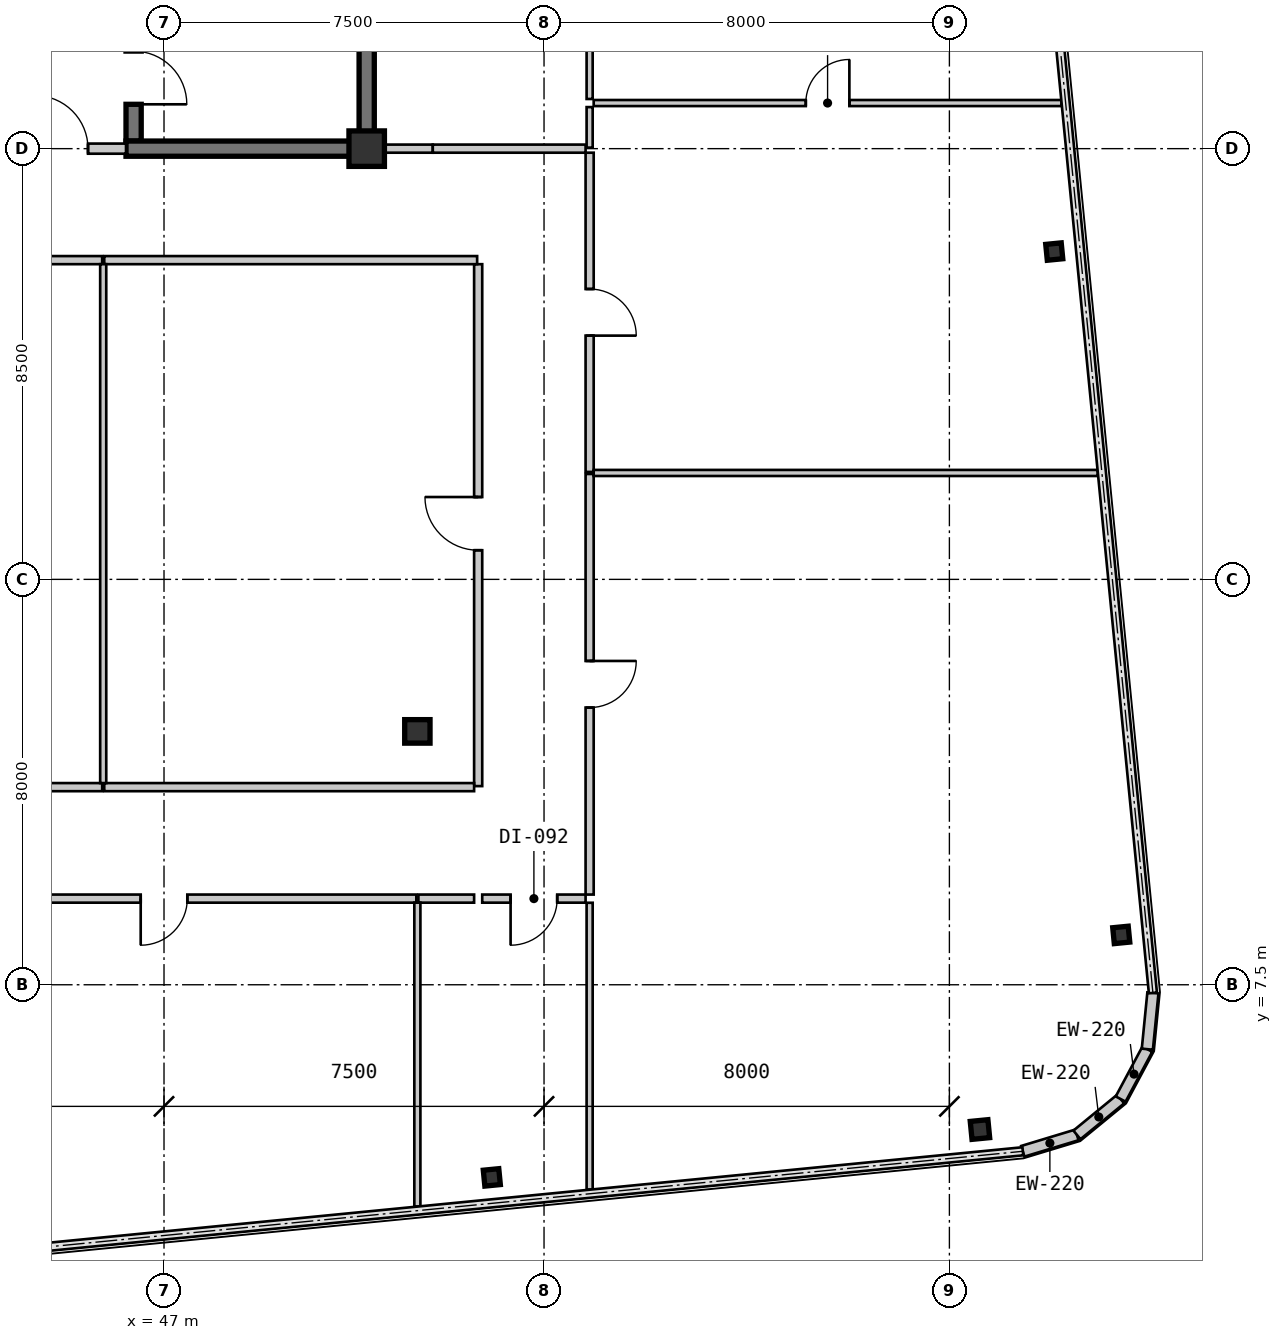
"""IFC4 building model, lengths in metres.
Left out: names, types, materials, properties, quantities, classifications, styles, units other than length and angle.
Written with IfcOpenShell. Run it as: python <this file> out.ifc"""

import sys

from ifc_helpers import new_model, si_unit, direction, frame, frame_2d, origin, origin_2d, place, context, subcontext, project, spatial, rectangle, i_section, extrude, source, transform, mapped, element, fill, save


model = new_model("IFC4")
c1 = context("Model", 3, precision=1e-05, world=origin(), true_north=direction((0.0, 1.0)))
c2 = subcontext(c1, "Body", "Model", "MODEL_VIEW")
j1 = project(units=[si_unit("LENGTHUNIT", "METRE"), si_unit("PLANEANGLEUNIT", "RADIAN")], contexts=[c1])
p1 = place(None, origin())
s1 = spatial("IfcSite", under=j1, at=p1, CompositionType="ELEMENT")
p2 = place(p1, origin())
s2 = spatial("IfcBuilding", under=s1, at=p2, CompositionType="ELEMENT")
p3 = place(p2, frame((0.0, 0.0, 93.45)))
s3 = spatial("IfcBuildingStorey", under=s2, at=p3, CompositionType="ELEMENT", Elevation=93.45)
m1 = source(origin(), c2, "Body", "SweptSolid", [
    extrude(rectangle(XDim=0.7, YDim=0.7, at=origin_2d()), origin(), (0.0, 0.0, 1.0), 3.15),
])
p4 = place(p3, frame((51.0, 24.0, 0.0), z_axis=(0.0, 0.0, 1.0), x_axis=(1.0, 0.0, 0.0)))
e1 = element("IfcColumn", 1, at=p4, inside=s3, PredefinedType="COLUMN", context=c2, shape_type="MappedRepresentation", body=[
    mapped(m1, transform((0.0, 0.0, 0.0), scale=1.0)),
])
m2 = source(origin(), c2, "Body", "SweptSolid", [
    extrude(i_section(OverallWidth=0.5, OverallDepth=0.464, WebThickness=0.022, FlangeThickness=0.034, at=origin_2d()), origin(), (0.0, 0.0, 1.0), 3.15),
])
p5 = place(p3, frame((52.0, 12.5, 0.0), z_axis=(0.0, 0.0, 1.0), x_axis=(1.0, 0.0, 0.0)))
e2 = element("IfcColumn", 2, at=p5, inside=s3, PredefinedType="COLUMN", context=c2, shape_type="MappedRepresentation", body=[
    mapped(m2, transform((0.0, 0.0, 0.0), scale=1.0)),
])
m3 = source(origin(), c2, "Body", "SweptSolid", [
    extrude(i_section(OverallWidth=0.307, OverallDepth=0.315, WebThickness=0.012, FlangeThickness=0.019, at=origin_2d()), origin(), (0.0, 0.0, 1.0), 3.15),
])
p6 = place(p3, frame((53.469, 3.698, 0.0), z_axis=(0.0, 0.0, 1.0), x_axis=(0.995227399982, 0.097582899759, 0.0)))
e3 = element("IfcColumn", 3, at=p6, inside=s3, PredefinedType="COLUMN", context=c2, shape_type="MappedRepresentation", body=[
    mapped(m3, transform((0.0, 0.0, 0.0), scale=1.0)),
])
m4 = source(origin(), c2, "Body", "SweptSolid", [
    extrude(i_section(OverallWidth=0.35, OverallDepth=0.356, WebThickness=0.018, FlangeThickness=0.028, at=origin_2d()), origin(), (0.0, 0.0, 1.0), 3.15),
])
p7 = place(p3, frame((63.103, 4.643, 0.0), z_axis=(0.0, 0.0, 1.0), x_axis=(0.995227399982, 0.097582899759, 0.0)))
e4 = element("IfcColumn", 4, at=p7, inside=s3, PredefinedType="COLUMN", context=c2, shape_type="MappedRepresentation", body=[
    mapped(m4, transform((0.0, 0.0, 0.0), scale=1.0)),
])
for number, where, z_axis, x_axis in (
    (5, (65.892, 8.484, 0.0), (0.0, 0.0, 1.0), (0.995, 0.098, 0.0)),
    (6, (64.57, 21.969, 0.0), (0.0, 0.0, 1.0), (0.995, 0.098, 0.0)),
):
    element("IfcColumn", number, at=place(p3, frame(where, z_axis=z_axis, x_axis=x_axis)), inside=s3, PredefinedType="COLUMN", context=c2, shape_type="MappedRepresentation", body=[
        mapped(m3, transform((0.0, 0.0, 0.0), scale=1.0)),
    ])
m5 = source(origin(), c2, "Body", "SweptSolid", [
    extrude(rectangle(XDim=1.116, YDim=0.22, at=frame_2d((0.558, 0.0))), origin(), (0.0, 0.0, 1.0), 2.93),
])
p8 = place(p3, frame((63.949, 4.214, 0.0), z_axis=(0.0, 0.0, 1.0), x_axis=(0.957052003726, 0.289916301997, 0.0)))
e7 = element("IfcWall", 7, at=p8, inside=s3, PredefinedType="SOLIDWALL", context=c2, shape_type="MappedRepresentation", body=[
    mapped(m5, transform((0.0, 0.0, 0.0), scale=1.0)),
])
m6 = source(origin(), c2, "Body", "SweptSolid", [
    extrude(rectangle(XDim=1.116, YDim=0.22, at=frame_2d((0.558, 0.0))), origin(), (0.0, 0.0, 1.0), 2.93),
])
p9 = place(p3, frame((65.017, 4.537, 0.0), z_axis=(0.0, 0.0, 1.0), x_axis=(0.773342870285, 0.633988016432, 0.0)))
e8 = element("IfcWall", 8, at=p9, inside=s3, PredefinedType="SOLIDWALL", context=c2, shape_type="MappedRepresentation", body=[
    mapped(m6, transform((0.0, 0.0, 0.0), scale=1.0)),
])
p10 = place(p3, frame((65.88, 5.245, 0.0), z_axis=(0.0, 0.0, 1.0), x_axis=(0.471723463201, 0.881746547635, 0.0)))
e9 = element("IfcWall", 9, at=p10, inside=s3, PredefinedType="SOLIDWALL", context=c2, shape_type="MappedRepresentation", body=[
    mapped(m5, transform((0.0, 0.0, 0.0), scale=1.0)),
])
p11 = place(p3, frame((66.406, 6.229, 0.0), z_axis=(0.0, 0.0, 1.0), x_axis=(0.09844234778, 0.995142755671, 0.0)))
e10 = element("IfcWall", 10, at=p11, inside=s3, PredefinedType="SOLIDWALL", context=c2, shape_type="MappedRepresentation", body=[
    mapped(m6, transform((0.0, 0.0, 0.0), scale=1.0)),
])
m7 = source(origin(), c2, "Body", "SweptSolid", [
    extrude(rectangle(XDim=4.05, YDim=0.3, at=frame_2d((2.025, 0.0))), origin(), (0.0, 0.0, 1.0), 2.93),
])
p12 = place(p3, frame((51.0, 24.15, 0.0), z_axis=(0.0, 0.0, 1.0), x_axis=(0.0, 1.0, 0.0)))
e11 = element("IfcWall", 11, at=p12, inside=s3, PredefinedType="SHEAR", context=c2, shape_type="MappedRepresentation", body=[
    mapped(m7, transform((0.0, 0.0, 0.0), scale=1.0)),
])
m8 = source(origin(), c2, "Body", "SweptSolid", [
    extrude(rectangle(XDim=3.9, YDim=0.3, at=frame_2d((1.95, 0.0))), origin(), (0.0, 0.0, 1.0), 2.93),
])
p13 = place(p3, frame((46.4, 28.05, 0.0), z_axis=(0.0, 0.0, 1.0), x_axis=(0.0, -1.0, 0.0)))
e12 = element("IfcWall", 12, at=p13, inside=s3, PredefinedType="SHEAR", context=c2, shape_type="MappedRepresentation", body=[
    mapped(m8, transform((0.0, 0.0, 0.0), scale=1.0)),
])
m9 = source(origin(), c2, "Body", "SweptSolid", [
    extrude(rectangle(XDim=1.05, YDim=2.1, at=frame_2d((0.525, 1.05))), frame((0.0, 0.16, 0.0), z_axis=(0.0, -1.0, 0.0), x_axis=(1.0, 0.0, 0.0)), (0.0, 0.0, 1.0), 0.32),
])
p14 = place(p13, frame((2.125, 0.0, 0.0)))
e13 = element("IfcOpeningElement", 13, at=p14, cuts=e12, PredefinedType="OPENING", context=c2, shape_type="MappedRepresentation", body=[
    mapped(m9, transform((0.0, 0.0, 0.0), scale=1.0)),
])
m10 = source(origin(), c2, "Body", "SweptSolid", [
    extrude(rectangle(XDim=4.9, YDim=0.3, at=frame_2d((2.45, 0.0))), origin(), (0.0, 0.0, 1.0), 2.93),
])
p15 = place(p3, frame((46.25, 24.0, 0.0), z_axis=(0.0, 0.0, 1.0), x_axis=(1.0, 0.0, 0.0)))
e14 = element("IfcWall", 14, at=p15, inside=s3, PredefinedType="SHEAR", context=c2, shape_type="MappedRepresentation", body=[
    mapped(m10, transform((0.0, 0.0, 0.0), scale=1.0)),
])
m11 = source(origin(), c2, "Body", "SweptSolid", [
    extrude(rectangle(XDim=2.7, YDim=0.2, at=frame_2d((1.35, 0.0))), origin(), (0.0, 0.0, 1.0), 2.397),
])
p16 = place(p3, frame((43.55, 24.0, 0.0), z_axis=(0.0, 0.0, 1.0), x_axis=(1.0, 0.0, 0.0)))
e15 = element("IfcWall", 15, at=p16, inside=s3, PredefinedType="SOLIDWALL", context=c2, shape_type="MappedRepresentation", body=[
    mapped(m11, transform((0.0, 0.0, 0.0), scale=1.0)),
])
m12 = source(origin(), c2, "Body", "SweptSolid", [
    extrude(rectangle(XDim=1.05, YDim=2.1, at=frame_2d((0.525, 1.05))), frame((0.0, 0.11, 0.0), z_axis=(0.0, -1.0, 0.0), x_axis=(1.0, 0.0, 0.0)), (0.0, 0.0, 1.0), 0.22),
])
p17 = place(p16, frame((0.9, 0.0, 0.0)))
e16 = element("IfcOpeningElement", 16, at=p17, cuts=e15, PredefinedType="OPENING", context=c2, shape_type="MappedRepresentation", body=[
    mapped(m12, transform((0.0, 0.0, 0.0), scale=1.0)),
])
m13 = source(origin(), c2, "Body", "SweptSolid", [
    extrude(rectangle(XDim=7.26, YDim=0.16, at=frame_2d((3.63, 0.0))), origin(), (0.0, 0.0, 1.0), 2.93),
])
p18 = place(p3, frame((45.78, 21.8, 0.0), z_axis=(0.0, 0.0, 1.0), x_axis=(-1.0, 0.0, 0.0)))
e17 = element("IfcWall", 17, at=p18, inside=s3, PredefinedType="PARTITIONING", context=c2, shape_type="MappedRepresentation", body=[
    mapped(m13, transform((0.0, 0.0, 0.0), scale=1.0)),
])
m14 = source(origin(), c2, "Body", "SweptSolid", [
    extrude(rectangle(XDim=1.05, YDim=2.1, at=frame_2d((0.525, 1.05))), frame((0.0, 0.09, 0.0), z_axis=(0.0, -1.0, 0.0), x_axis=(1.0, 0.0, 0.0)), (0.0, 0.0, 1.0), 0.18),
])
p19 = place(p18, frame((3.105, 0.0, 0.0)))
e18 = element("IfcOpeningElement", 18, at=p19, cuts=e17, PredefinedType="OPENING", context=c2, shape_type="MappedRepresentation", body=[
    mapped(m14, transform((0.0, 0.0, 0.0), scale=1.0)),
])
m15 = source(origin(), c2, "Body", "SweptSolid", [
    extrude(rectangle(XDim=10.3, YDim=0.16, at=frame_2d((5.15, 0.0))), origin(), (0.0, 0.0, 1.0), 2.93),
])
p20 = place(p3, frame((53.2, 11.42, 0.0), z_axis=(0.0, 0.0, 1.0), x_axis=(0.0, 1.0, 0.0)))
e19 = element("IfcWall", 19, at=p20, inside=s3, PredefinedType="PARTITIONING", context=c2, shape_type="MappedRepresentation", body=[
    mapped(m15, transform((0.0, 0.0, 0.0), scale=1.0)),
])
p21 = place(p20, frame((4.655, 0.0, 0.0)))
e20 = element("IfcOpeningElement", 20, at=p21, cuts=e19, PredefinedType="OPENING", context=c2, shape_type="MappedRepresentation", body=[
    mapped(m14, transform((0.0, 0.0, 0.0), scale=1.0)),
])
m16 = source(origin(), c2, "Body", "SweptSolid", [
    extrude(rectangle(XDim=7.359, YDim=0.16, at=frame_2d((3.68, 0.0))), origin(), (0.0, 0.0, 1.0), 2.93),
])
p22 = place(p3, frame((53.18, 21.8, 0.0), z_axis=(0.0, 0.0, 1.0), x_axis=(-1.0, 0.0, 0.0)))
e21 = element("IfcWall", 21, at=p22, inside=s3, PredefinedType="PARTITIONING", context=c2, shape_type="MappedRepresentation", body=[
    mapped(m16, transform((0.0, 0.0, 0.0), scale=1.0)),
])
m17 = source(origin(), c2, "Body", "SweptSolid", [
    extrude(rectangle(XDim=2.04, YDim=0.16, at=frame_2d((1.02, 0.0))), origin(), (0.0, 0.0, 1.0), 2.93),
])
p23 = place(p3, frame((55.32, 9.2, 0.0), z_axis=(0.0, 0.0, 1.0), x_axis=(-1.0, 0.0, 0.0)))
e22 = element("IfcWall", 22, at=p23, inside=s3, PredefinedType="PARTITIONING", context=c2, shape_type="MappedRepresentation", body=[
    mapped(m17, transform((0.0, 0.0, 0.0), scale=1.0)),
])
m18 = source(origin(), c2, "Body", "SweptSolid", [
    extrude(rectangle(XDim=0.92, YDim=2.1, at=frame_2d((0.46, 1.05))), frame((0.0, 0.09, 0.0), z_axis=(0.0, -1.0, 0.0), x_axis=(1.0, 0.0, 0.0)), (0.0, 0.0, 1.0), 0.18),
])
p24 = place(p23, frame((0.56, 0.0, 0.0)))
e23 = element("IfcOpeningElement", 23, at=p24, cuts=e22, PredefinedType="OPENING", context=c2, shape_type="MappedRepresentation", body=[
    mapped(m18, transform((0.0, 0.0, 0.0), scale=1.0)),
])
m19 = source(origin(), c2, "Body", "SweptSolid", [
    extrude(rectangle(XDim=8.3, YDim=0.16, at=frame_2d((4.15, 0.0))), origin(), (0.0, 0.0, 1.0), 2.93),
])
p25 = place(p3, frame((55.4, 17.58, 0.0), z_axis=(0.0, 0.0, 1.0), x_axis=(0.0, -1.0, 0.0)))
e24 = element("IfcWall", 24, at=p25, inside=s3, PredefinedType="PARTITIONING", context=c2, shape_type="MappedRepresentation", body=[
    mapped(m19, transform((0.0, 0.0, 0.0), scale=1.0)),
])
p26 = place(p25, frame((3.69, 0.0, 0.0)))
e25 = element("IfcOpeningElement", 25, at=p26, cuts=e24, PredefinedType="OPENING", context=c2, shape_type="MappedRepresentation", body=[
    mapped(m18, transform((0.0, 0.0, 0.0), scale=1.0)),
])
m20 = source(origin(), c2, "Body", "SweptSolid", [
    extrude(rectangle(XDim=6.3, YDim=0.16, at=frame_2d((3.15, 0.0))), origin(), (0.0, 0.0, 1.0), 2.93),
])
p27 = place(p3, frame((55.4, 23.92, 0.0), z_axis=(0.0, 0.0, 1.0), x_axis=(0.0, -1.0, 0.0)))
e26 = element("IfcWall", 26, at=p27, inside=s3, PredefinedType="PARTITIONING", context=c2, shape_type="MappedRepresentation", body=[
    mapped(m20, transform((0.0, 0.0, 0.0), scale=1.0)),
])
p28 = place(p27, frame((2.69, 0.0, 0.0)))
e27 = element("IfcOpeningElement", 27, at=p28, cuts=e26, PredefinedType="OPENING", context=c2, shape_type="MappedRepresentation", body=[
    mapped(m18, transform((0.0, 0.0, 0.0), scale=1.0)),
])
m21 = source(origin(), c2, "Body", "SweptSolid", [
    extrude(rectangle(XDim=1.155, YDim=0.16, at=frame_2d((0.577, 0.0))), origin(), (0.0, 0.0, 1.0), 2.328),
])
p29 = place(p3, frame((51.15, 24.0, 0.0), z_axis=(0.0, 0.0, 1.0), x_axis=(1.0, 0.0, 0.0)))
e28 = element("IfcWall", 28, at=p29, inside=s3, PredefinedType="PARTITIONING", context=c2, shape_type="MappedRepresentation", body=[
    mapped(m21, transform((0.0, 0.0, 0.0), scale=1.0)),
])
m22 = source(origin(), c2, "Body", "SweptSolid", [
    extrude(rectangle(XDim=3.016, YDim=0.16, at=frame_2d((1.508, 0.0))), origin(), (0.0, 0.0, 1.0), 2.93),
])
p30 = place(p3, frame((52.304, 24.0, 0.0), z_axis=(0.0, 0.0, 1.0), x_axis=(1.0, 0.0, 0.0)))
e29 = element("IfcWall", 29, at=p30, inside=s3, PredefinedType="PARTITIONING", context=c2, shape_type="MappedRepresentation", body=[
    mapped(m22, transform((0.0, 0.0, 0.0), scale=1.0)),
])
p31 = place(p3, frame((38.52, 11.4, 0.0), z_axis=(0.0, 0.0, 1.0), x_axis=(1.0, 0.0, 0.0)))
e30 = element("IfcWall", 30, at=p31, inside=s3, PredefinedType="PARTITIONING", context=c2, shape_type="MappedRepresentation", body=[
    mapped(m13, transform((0.0, 0.0, 0.0), scale=1.0)),
])
m23 = source(origin(), c2, "Body", "SweptSolid", [
    extrude(rectangle(XDim=7.3, YDim=0.16, at=frame_2d((3.65, 0.0))), origin(), (0.0, 0.0, 1.0), 2.93),
])
p32 = place(p3, frame((45.82, 11.4, 0.0), z_axis=(0.0, 0.0, 1.0), x_axis=(1.0, 0.0, 0.0)))
e31 = element("IfcWall", 31, at=p32, inside=s3, PredefinedType="PARTITIONING", context=c2, shape_type="MappedRepresentation", body=[
    mapped(m23, transform((0.0, 0.0, 0.0), scale=1.0)),
])
m24 = source(origin(), c2, "Body", "SweptSolid", [
    extrude(rectangle(XDim=9.959, YDim=0.16, at=frame_2d((4.98, 0.0))), origin(), (0.0, 0.0, 1.0), 2.93),
])
p33 = place(p3, frame((51.98, 9.2, 0.0), z_axis=(0.0, 0.0, 1.0), x_axis=(-1.0, 0.0, 0.0)))
e32 = element("IfcWall", 32, at=p33, inside=s3, PredefinedType="PARTITIONING", context=c2, shape_type="MappedRepresentation", body=[
    mapped(m24, transform((0.0, 0.0, 0.0), scale=1.0)),
])
p34 = place(p33, frame((4.52, 0.0, 0.0)))
e33 = element("IfcOpeningElement", 33, at=p34, cuts=e32, PredefinedType="OPENING", context=c2, shape_type="MappedRepresentation", body=[
    mapped(m18, transform((0.0, 0.0, 0.0), scale=1.0)),
])
m25 = source(origin(), c2, "Body", "SweptSolid", [
    extrude(rectangle(XDim=1.1, YDim=0.16, at=frame_2d((0.55, 0.0))), origin(), (0.0, 0.0, 1.0), 2.93),
])
p35 = place(p3, frame((53.12, 9.2, 0.0), z_axis=(0.0, 0.0, 1.0), x_axis=(-1.0, 0.0, 0.0)))
e34 = element("IfcWall", 34, at=p35, inside=s3, PredefinedType="PARTITIONING", context=c2, shape_type="MappedRepresentation", body=[
    mapped(m25, transform((0.0, 0.0, 0.0), scale=1.0)),
])
m26 = source(origin(), c2, "Body", "SweptSolid", [
    extrude(rectangle(XDim=10.24, YDim=0.12, at=frame_2d((5.12, 0.0))), origin(), (0.0, 0.0, 1.0), 2.93),
])
p36 = place(p3, frame((45.8, 21.72, 0.0), z_axis=(0.0, 0.0, 1.0), x_axis=(0.0, -1.0, 0.0)))
e35 = element("IfcWall", 35, at=p36, inside=s3, PredefinedType="PARTITIONING", context=c2, shape_type="MappedRepresentation", body=[
    mapped(m26, transform((0.0, 0.0, 0.0), scale=1.0)),
])
m27 = source(origin(), c2, "Body", "SweptSolid", [
    extrude(rectangle(XDim=5.996, YDim=0.12, at=frame_2d((2.998, 0.0))), origin(), (0.0, 0.0, 1.0), 2.93),
])
p37 = place(p3, frame((52.0, 9.12, 0.0), z_axis=(0.0, 0.0, 1.0), x_axis=(0.0, -1.0, 0.0)))
e36 = element("IfcWall", 36, at=p37, inside=s3, PredefinedType="PARTITIONING", context=c2, shape_type="MappedRepresentation", body=[
    mapped(m27, transform((0.0, 0.0, 0.0), scale=1.0)),
])
m28 = source(origin(), c2, "Body", "SweptSolid", [
    extrude(rectangle(XDim=5.658, YDim=0.12, at=frame_2d((2.829, 0.0))), origin(), (0.0, 0.0, 1.0), 2.93),
])
p38 = place(p3, frame((55.4, 9.118, 0.0), z_axis=(0.0, 0.0, 1.0), x_axis=(0.0, -1.0, 0.0)))
e37 = element("IfcWall", 37, at=p38, inside=s3, PredefinedType="PARTITIONING", context=c2, shape_type="MappedRepresentation", body=[
    mapped(m28, transform((0.0, 0.0, 0.0), scale=1.0)),
])
m29 = source(origin(), c2, "Body", "SweptSolid", [
    extrude(rectangle(XDim=9.948, YDim=0.12, at=frame_2d((4.974, 0.0))), origin(), (0.0, 0.0, 1.0), 2.93),
])
p39 = place(p3, frame((55.48, 17.6, 0.0), z_axis=(0.0, 0.0, 1.0), x_axis=(1.0, 0.0, 0.0)))
e38 = element("IfcWall", 38, at=p39, inside=s3, PredefinedType="PARTITIONING", context=c2, shape_type="MappedRepresentation", body=[
    mapped(m29, transform((0.0, 0.0, 0.0), scale=1.0)),
])
m30 = source(origin(), c2, "Body", "SweptSolid", [
    extrude(rectangle(XDim=9.232, YDim=0.12, at=frame_2d((4.616, 0.0))), origin(), (0.0, 0.0, 1.0), 2.93),
])
p40 = place(p3, frame((55.48, 24.9, 0.0), z_axis=(0.0, 0.0, 1.0), x_axis=(1.0, 0.0, 0.0)))
e39 = element("IfcWall", 39, at=p40, inside=s3, PredefinedType="PARTITIONING", context=c2, shape_type="MappedRepresentation", body=[
    mapped(m30, transform((0.0, 0.0, 0.0), scale=1.0)),
])
m31 = source(origin(), c2, "Body", "SweptSolid", [
    extrude(rectangle(XDim=0.86, YDim=2.1, at=frame_2d((0.43, 1.05))), frame((0.0, 0.07, 0.0), z_axis=(0.0, -1.0, 0.0), x_axis=(1.0, 0.0, 0.0)), (0.0, 0.0, 1.0), 0.14),
])
p41 = place(p40, frame((4.186, 0.0, 0.0)))
e40 = element("IfcOpeningElement", 40, at=p41, cuts=e39, PredefinedType="OPENING", context=c2, shape_type="MappedRepresentation", body=[
    mapped(m31, transform((0.0, 0.0, 0.0), scale=1.0)),
])
m32 = source(origin(), c2, "Body", "SweptSolid", [
    extrude(rectangle(XDim=0.8, YDim=0.12, at=frame_2d((0.4, 0.0))), origin(), (0.0, 0.0, 1.0), 2.93),
])
p42 = place(p3, frame((55.4, 24.02, 0.0), z_axis=(0.0, 0.0, 1.0), x_axis=(0.0, 1.0, 0.0)))
e41 = element("IfcWall", 41, at=p42, inside=s3, PredefinedType="PARTITIONING", context=c2, shape_type="MappedRepresentation", body=[
    mapped(m32, transform((0.0, 0.0, 0.0), scale=1.0)),
])
m33 = source(origin(), c2, "Body", "SweptSolid", [
    extrude(rectangle(XDim=6.54, YDim=0.12, at=frame_2d((3.27, 0.0))), origin(), (0.0, 0.0, 1.0), 2.93),
])
p43 = place(p3, frame((55.4, 24.98, 0.0), z_axis=(0.0, 0.0, 1.0), x_axis=(0.0, 1.0, 0.0)))
e42 = element("IfcWall", 42, at=p43, inside=s3, PredefinedType="PARTITIONING", context=c2, shape_type="MappedRepresentation", body=[
    mapped(m33, transform((0.0, 0.0, 0.0), scale=1.0)),
])
m34 = source(origin(), c2, "Body", "SweptSolid", [
    extrude(rectangle(XDim=1.05, YDim=2.1, at=frame_2d((0.525, 1.05))), frame((0.0, 0.025, 0.0), z_axis=(0.0, -1.0, 0.0), x_axis=(1.0, 0.0, 0.0)), (0.0, 0.0, 1.0), 0.05),
])
p44 = place(p14, origin())
e43 = element("IfcDoor", 43, at=p44, inside=s3, OperationType="SINGLE_SWING_RIGHT", PredefinedType="DOOR", context=c2, shape_type="MappedRepresentation", body=[
    mapped(m34, transform((0.0, 0.0, 0.0), scale=1.0)),
])
fill(e13, e43)
p45 = place(p17, origin())
e44 = element("IfcDoor", 44, at=p45, inside=s3, OperationType="SINGLE_SWING_LEFT", PredefinedType="DOOR", context=c2, shape_type="MappedRepresentation", body=[
    mapped(m34, transform((0.0, 0.0, 0.0), scale=1.0)),
])
fill(e16, e44)
p46 = place(p21, origin())
e45 = element("IfcDoor", 45, at=p46, inside=s3, OperationType="SINGLE_SWING_RIGHT", PredefinedType="DOOR", context=c2, shape_type="MappedRepresentation", body=[
    mapped(m34, transform((0.0, 0.0, 0.0), scale=1.0)),
])
fill(e20, e45)
m35 = source(origin(), c2, "Body", "SweptSolid", [
    extrude(rectangle(XDim=0.92, YDim=2.1, at=frame_2d((0.46, 1.05))), frame((0.0, 0.025, 0.0), z_axis=(0.0, -1.0, 0.0), x_axis=(1.0, 0.0, 0.0)), (0.0, 0.0, 1.0), 0.05),
])
p47 = place(p24, origin())
e46 = element("IfcDoor", 46, at=p47, inside=s3, OperationType="SINGLE_SWING_RIGHT", PredefinedType="DOOR", context=c2, shape_type="MappedRepresentation", body=[
    mapped(m35, transform((0.0, 0.0, 0.0), scale=1.0)),
])
fill(e23, e46)
p48 = place(p26, origin())
e47 = element("IfcDoor", 47, at=p48, inside=s3, OperationType="SINGLE_SWING_LEFT", PredefinedType="DOOR", context=c2, shape_type="MappedRepresentation", body=[
    mapped(m35, transform((0.0, 0.0, 0.0), scale=1.0)),
])
fill(e25, e47)
p49 = place(p28, origin())
e48 = element("IfcDoor", 48, at=p49, inside=s3, OperationType="SINGLE_SWING_RIGHT", PredefinedType="DOOR", context=c2, shape_type="MappedRepresentation", body=[
    mapped(m35, transform((0.0, 0.0, 0.0), scale=1.0)),
])
fill(e27, e48)
p50 = place(p34, origin())
e49 = element("IfcDoor", 49, at=p50, inside=s3, OperationType="SINGLE_SWING_RIGHT", PredefinedType="DOOR", context=c2, shape_type="MappedRepresentation", body=[
    mapped(m35, transform((0.0, 0.0, 0.0), scale=1.0)),
])
fill(e33, e49)
m36 = source(origin(), c2, "Body", "SweptSolid", [
    extrude(rectangle(XDim=0.86, YDim=2.1, at=frame_2d((0.43, 1.05))), frame((0.0, 0.025, 0.0), z_axis=(0.0, -1.0, 0.0), x_axis=(1.0, 0.0, 0.0)), (0.0, 0.0, 1.0), 0.05),
])
p51 = place(p41, origin())
e50 = element("IfcDoor", 50, at=p51, inside=s3, OperationType="SINGLE_SWING_RIGHT", PredefinedType="DOOR", context=c2, shape_type="MappedRepresentation", body=[
    mapped(m36, transform((0.0, 0.0, 0.0), scale=1.0)),
])
fill(e40, e50)
save(model, sys.argv[1])
